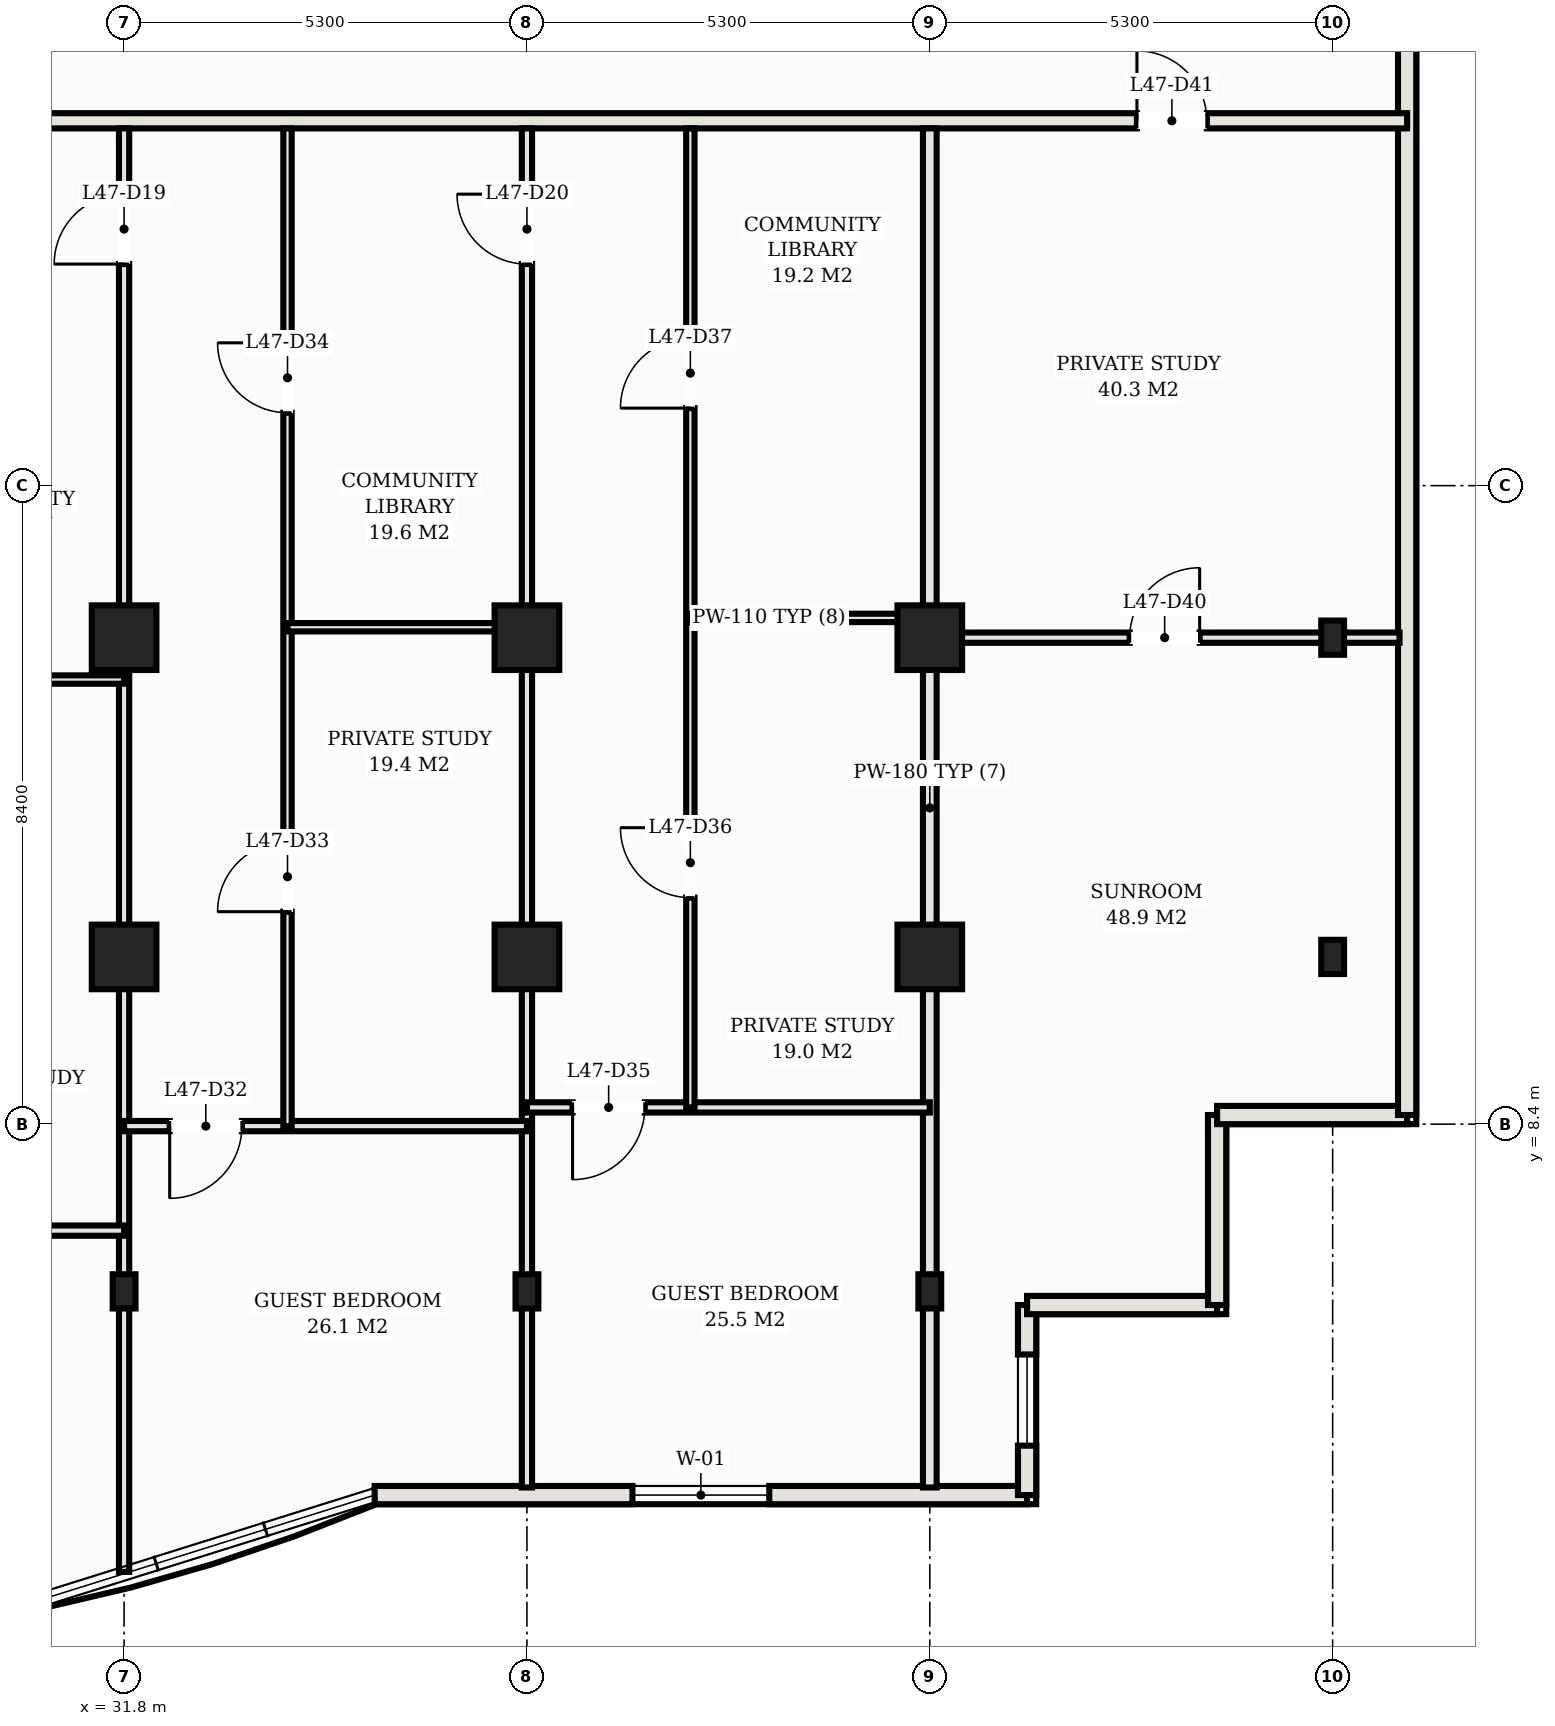
"""IFC4 building model, lengths in metres.
Left out: names, types, materials, properties, quantities, classifications, styles, units other than length and angle.
Written with IfcOpenShell. Run it as: python <this file> out.ifc"""

import sys

from ifc_helpers import new_model, si_unit, direction, frame, frame_2d, origin, origin_2d, place, context, subcontext, project, spatial, rectangle, hollow_rectangle, extrude, element, fill, save


model = new_model("IFC4")
c1 = context("Model", 3, precision=1e-05, world=origin(), true_north=direction((0.0, 1.0)))
c2 = subcontext(c1, "Body", "Model", "MODEL_VIEW")
j1 = project(units=[si_unit("LENGTHUNIT", "METRE"), si_unit("PLANEANGLEUNIT", "RADIAN")], contexts=[c1])
p1 = place(None, origin())
s1 = spatial("IfcSite", under=j1, at=p1, CompositionType="ELEMENT")
p2 = place(p1, origin())
s2 = spatial("IfcBuilding", under=s1, at=p2, CompositionType="ELEMENT")
p3 = place(p2, frame((0.0, 0.0, 172.2)))
s3 = spatial("IfcBuildingStorey", under=s2, at=p3, CompositionType="ELEMENT", Elevation=172.2)
for number, where, z_axis, x_axis in (
    (1, (31.8, 14.8, 0.0), (0.0, 0.0, 1.0), (1.0, 0.0, 0.0)),
    (2, (31.8, 10.6, 0.0), (0.0, 0.0, 1.0), (1.0, 0.0, 0.0)),
    (3, (37.1, 14.8, 0.0), (0.0, 0.0, 1.0), (1.0, 0.0, 0.0)),
    (4, (37.1, 10.6, 0.0), (0.0, 0.0, 1.0), (1.0, 0.0, 0.0)),
    (5, (42.4, 14.8, 0.0), (0.0, 0.0, 1.0), (1.0, 0.0, 0.0)),
    (6, (42.4, 10.6, 0.0), (0.0, 0.0, 1.0), (1.0, 0.0, 0.0)),
):
    element("IfcColumn", number, at=place(p3, frame(where, z_axis=z_axis, x_axis=x_axis)), inside=s3, PredefinedType="COLUMN", context=c2, shape_type="SweptSolid", body=[
        extrude(hollow_rectangle(XDim=0.85, YDim=0.85, WallThickness=0.028, at=origin_2d()), origin(), (0.0, 0.0, 1.0), 3.3),
    ])
for number, where, z_axis, x_axis in (
    (7, (31.8, 6.2, 0.0), (0.0, 0.0, 1.0), (1.0, 0.0, 0.0)),
    (8, (37.1, 6.2, 0.0), (0.0, 0.0, 1.0), (1.0, 0.0, 0.0)),
    (9, (42.4, 6.2, 0.0), (0.0, 0.0, 1.0), (1.0, 0.0, 0.0)),
    (10, (47.7, 10.6, 0.0), (0.0, 0.0, 1.0), (1.0, 0.0, 0.0)),
    (11, (47.7, 14.8, 0.0), (0.0, 0.0, 1.0), (1.0, 0.0, 0.0)),
):
    element("IfcColumn", number, at=place(p3, frame(where, z_axis=z_axis, x_axis=x_axis)), inside=s3, PredefinedType="COLUMN", context=c2, shape_type="SweptSolid", body=[
        extrude(hollow_rectangle(XDim=0.3, YDim=0.45, WallThickness=0.016, at=origin_2d()), origin(), (0.0, 0.0, 1.0), 3.3),
    ])
p4 = place(p3, frame((35.097, 3.52, 0.0), z_axis=(0.0, 0.0, 1.0), x_axis=(1.0, 0.0, 0.0)))
e12 = element("IfcWall", 12, at=p4, inside=s3, PredefinedType="SOLIDWALL", context=c2, shape_type="SweptSolid", body=[
    extrude(rectangle(XDim=8.583, YDim=0.24, at=frame_2d((4.292, 0.0))), origin(), (0.0, 0.0, 1.0), 3.1),
])
p5 = place(p4, frame((3.391, 0.0, 0.75)))
e13 = element("IfcOpeningElement", 13, at=p5, cuts=e12, PredefinedType="OPENING", context=c2, shape_type="SweptSolid", body=[
    extrude(rectangle(XDim=1.8, YDim=1.7, at=frame_2d((0.9, 0.85))), frame((0.0, 0.13, 0.0), z_axis=(0.0, -1.0, 0.0), x_axis=(1.0, 0.0, 0.0)), (0.0, 0.0, 1.0), 0.26),
])
p6 = place(p3, frame((43.68, 3.52, 0.0), z_axis=(0.0, 0.0, 1.0), x_axis=(0.0, 1.0, 0.0)))
e14 = element("IfcWall", 14, at=p6, inside=s3, PredefinedType="SOLIDWALL", context=c2, shape_type="SweptSolid", body=[
    extrude(rectangle(XDim=2.5, YDim=0.24, at=frame_2d((1.25, 0.0))), origin(), (0.0, 0.0, 1.0), 3.1),
])
p7 = place(p6, frame((0.65, 0.0, 0.75)))
e15 = element("IfcOpeningElement", 15, at=p7, cuts=e14, PredefinedType="OPENING", context=c2, shape_type="SweptSolid", body=[
    extrude(rectangle(XDim=1.2, YDim=1.5, at=frame_2d((0.6, 0.75))), frame((0.0, 0.13, 0.0), z_axis=(0.0, -1.0, 0.0), x_axis=(1.0, 0.0, 0.0)), (0.0, 0.0, 1.0), 0.26),
])
for number, where, z_axis, x_axis in (
    (16, (43.68, 6.02, 0.0), (0.0, 0.0, 1.0), (1.0, 0.0, 0.0)),
    (17, (46.18, 6.02, 0.0), (0.0, 0.0, 1.0), (0.0, 1.0, 0.0)),
    (18, (46.18, 8.52, 0.0), (0.0, 0.0, 1.0), (1.0, 0.0, 0.0)),
):
    element("IfcWall", number, at=place(p3, frame(where, z_axis=z_axis, x_axis=x_axis)), inside=s3, PredefinedType="SOLIDWALL", context=c2, shape_type="SweptSolid", body=[
        extrude(rectangle(XDim=2.5, YDim=0.24, at=frame_2d((1.25, 0.0))), origin(), (0.0, 0.0, 1.0), 3.1),
    ])
p8 = place(p3, frame((48.68, 8.52, 0.0), z_axis=(0.0, 0.0, 1.0), x_axis=(0.0, 1.0, 0.0)))
e19 = element("IfcWall", 19, at=p8, inside=s3, PredefinedType="SOLIDWALL", context=c2, shape_type="SweptSolid", body=[
    extrude(rectangle(XDim=27.41, YDim=0.24, at=frame_2d((13.705, 0.0))), origin(), (0.0, 0.0, 1.0), 3.1),
])
p9 = place(p8, frame((19.48, 0.0, 0.0)))
e20 = element("IfcOpeningElement", 20, at=p9, cuts=e19, PredefinedType="OPENING", context=c2, shape_type="SweptSolid", body=[
    extrude(rectangle(XDim=1.8, YDim=2.2, at=frame_2d((0.9, 1.1))), frame((0.0, 0.13, 0.0), z_axis=(0.0, -1.0, 0.0), x_axis=(1.0, 0.0, 0.0)), (0.0, 0.0, 1.0), 0.26),
])
p10 = place(p3, frame((4.32, 21.6, 0.0), z_axis=(0.0, 0.0, 1.0), x_axis=(1.0, 0.0, 0.0)))
e21 = element("IfcWall", 21, at=p10, inside=s3, PredefinedType="PARTITIONING", context=c2, shape_type="SweptSolid", body=[
    extrude(rectangle(XDim=44.36, YDim=0.2, at=frame_2d((22.18, 0.0))), origin(), (0.0, 0.0, 1.0), 2.38),
])
p11 = place(p10, frame((7.03, 0.0, 0.0)))
e22 = element("IfcOpeningElement", 22, at=p11, cuts=e21, PredefinedType="OPENING", context=c2, shape_type="SweptSolid", body=[
    extrude(rectangle(XDim=1.1, YDim=2.25, at=frame_2d((0.55, 1.125))), frame((0.0, 0.11, 0.0), z_axis=(0.0, -1.0, 0.0), x_axis=(1.0, 0.0, 0.0)), (0.0, 0.0, 1.0), 0.22),
])
p12 = place(p10, frame((2.635, 0.0, 0.0)))
e23 = element("IfcOpeningElement", 23, at=p12, cuts=e21, PredefinedType="OPENING", context=c2, shape_type="SweptSolid", body=[
    extrude(rectangle(XDim=0.92, YDim=2.15, at=frame_2d((0.46, 1.075))), frame((0.0, 0.11, 0.0), z_axis=(0.0, -1.0, 0.0), x_axis=(1.0, 0.0, 0.0)), (0.0, 0.0, 1.0), 0.22),
])
p13 = place(p10, frame((40.805, 0.0, 0.0)))
e24 = element("IfcOpeningElement", 24, at=p13, cuts=e21, PredefinedType="OPENING", context=c2, shape_type="SweptSolid", body=[
    extrude(rectangle(XDim=0.92, YDim=2.15, at=frame_2d((0.46, 1.075))), frame((0.0, 0.11, 0.0), z_axis=(0.0, -1.0, 0.0), x_axis=(1.0, 0.0, 0.0)), (0.0, 0.0, 1.0), 0.22),
])
p14 = place(p3, frame((42.4, 3.62, 0.0), z_axis=(0.0, 0.0, 1.0), x_axis=(0.0, 1.0, 0.0)))
e25 = element("IfcWall", 25, at=p14, inside=s3, PredefinedType="PARTITIONING", context=c2, shape_type="SweptSolid", body=[
    extrude(rectangle(XDim=17.88, YDim=0.18, at=frame_2d((8.94, 0.0))), origin(), (0.0, 0.0, 1.0), 2.38),
])
p15 = place(p3, frame((31.8, 2.509, 0.0), z_axis=(0.0, 0.0, 1.0), x_axis=(0.0, 1.0, 0.0)))
e26 = element("IfcWall", 26, at=p15, inside=s3, PredefinedType="PARTITIONING", context=c2, shape_type="SweptSolid", body=[
    extrude(rectangle(XDim=18.991, YDim=0.135, at=frame_2d((9.496, 0.0))), origin(), (0.0, 0.0, 1.0), 2.38),
])
p16 = place(p15, frame((17.206, 0.0, 0.0)))
e27 = element("IfcOpeningElement", 27, at=p16, cuts=e26, PredefinedType="OPENING", context=c2, shape_type="SweptSolid", body=[
    extrude(rectangle(XDim=0.92, YDim=2.15, at=frame_2d((0.46, 1.075))), frame((0.0, 0.078, 0.0), z_axis=(0.0, -1.0, 0.0), x_axis=(1.0, 0.0, 0.0)), (0.0, 0.0, 1.0), 0.155),
])
p17 = place(p3, frame((37.1, 3.62, 0.0), z_axis=(0.0, 0.0, 1.0), x_axis=(0.0, 1.0, 0.0)))
e28 = element("IfcWall", 28, at=p17, inside=s3, PredefinedType="PARTITIONING", context=c2, shape_type="SweptSolid", body=[
    extrude(rectangle(XDim=17.88, YDim=0.135, at=frame_2d((8.94, 0.0))), origin(), (0.0, 0.0, 1.0), 2.38),
])
p18 = place(p17, frame((16.095, 0.0, 0.0)))
e29 = element("IfcOpeningElement", 29, at=p18, cuts=e28, PredefinedType="OPENING", context=c2, shape_type="SweptSolid", body=[
    extrude(rectangle(XDim=0.92, YDim=2.15, at=frame_2d((0.46, 1.075))), frame((0.0, 0.078, 0.0), z_axis=(0.0, -1.0, 0.0), x_axis=(1.0, 0.0, 0.0)), (0.0, 0.0, 1.0), 0.155),
])
p19 = place(p3, frame((26.5, 6.999, 0.0), z_axis=(0.0, 0.0, 1.0), x_axis=(1.0, 0.0, 0.0)))
e30 = element("IfcWall", 30, at=p19, inside=s3, PredefinedType="PARTITIONING", context=c2, shape_type="SweptSolid", body=[
    extrude(rectangle(XDim=5.3, YDim=0.135, at=frame_2d((2.65, 0.0))), origin(), (0.0, 0.0, 1.0), 2.38),
])
p20 = place(p19, frame((0.8, 0.0, 0.0)))
e31 = element("IfcOpeningElement", 31, at=p20, cuts=e30, PredefinedType="OPENING", context=c2, shape_type="SweptSolid", body=[
    extrude(rectangle(XDim=0.95, YDim=2.15, at=frame_2d((0.475, 1.075))), frame((0.0, 0.078, 0.0), z_axis=(0.0, -1.0, 0.0), x_axis=(1.0, 0.0, 0.0)), (0.0, 0.0, 1.0), 0.155),
])
p21 = place(p3, frame((28.65, 14.249, 0.0), z_axis=(0.0, 0.0, 1.0), x_axis=(1.0, 0.0, 0.0)))
e32 = element("IfcWall", 32, at=p21, inside=s3, PredefinedType="MOVABLE", context=c2, shape_type="SweptSolid", body=[
    extrude(rectangle(XDim=3.15, YDim=0.11, at=frame_2d((1.575, 0.0))), origin(), (0.0, 0.0, 1.0), 2.38),
])
p22 = place(p3, frame((31.8, 8.374, 0.0), z_axis=(0.0, 0.0, 1.0), x_axis=(1.0, 0.0, 0.0)))
e33 = element("IfcWall", 33, at=p22, inside=s3, PredefinedType="PARTITIONING", context=c2, shape_type="SweptSolid", body=[
    extrude(rectangle(XDim=5.3, YDim=0.135, at=frame_2d((2.65, 0.0))), origin(), (0.0, 0.0, 1.0), 2.38),
])
p23 = place(p22, frame((0.6, 0.0, 0.0)))
e34 = element("IfcOpeningElement", 34, at=p23, cuts=e33, PredefinedType="OPENING", context=c2, shape_type="SweptSolid", body=[
    extrude(rectangle(XDim=0.95, YDim=2.15, at=frame_2d((0.475, 1.075))), frame((0.0, 0.078, 0.0), z_axis=(0.0, -1.0, 0.0), x_axis=(1.0, 0.0, 0.0)), (0.0, 0.0, 1.0), 0.155),
])
p24 = place(p3, frame((33.95, 8.374, 0.0), z_axis=(0.0, 0.0, 1.0), x_axis=(0.0, 1.0, 0.0)))
e35 = element("IfcWall", 35, at=p24, inside=s3, PredefinedType="MOVABLE", context=c2, shape_type="SweptSolid", body=[
    extrude(rectangle(XDim=13.126, YDim=0.11, at=frame_2d((6.563, 0.0))), origin(), (0.0, 0.0, 1.0), 2.38),
])
p25 = place(p24, frame((2.821, 0.0, 0.0)))
e36 = element("IfcOpeningElement", 36, at=p25, cuts=e35, PredefinedType="OPENING", context=c2, shape_type="SweptSolid", body=[
    extrude(rectangle(XDim=0.92, YDim=2.15, at=frame_2d((0.46, 1.075))), frame((0.0, 0.065, 0.0), z_axis=(0.0, -1.0, 0.0), x_axis=(1.0, 0.0, 0.0)), (0.0, 0.0, 1.0), 0.13),
])
p26 = place(p24, frame((9.385, 0.0, 0.0)))
e37 = element("IfcOpeningElement", 37, at=p26, cuts=e35, PredefinedType="OPENING", context=c2, shape_type="SweptSolid", body=[
    extrude(rectangle(XDim=0.92, YDim=2.15, at=frame_2d((0.46, 1.075))), frame((0.0, 0.065, 0.0), z_axis=(0.0, -1.0, 0.0), x_axis=(1.0, 0.0, 0.0)), (0.0, 0.0, 1.0), 0.13),
])
p27 = place(p3, frame((33.95, 14.937, 0.0), z_axis=(0.0, 0.0, 1.0), x_axis=(1.0, 0.0, 0.0)))
e38 = element("IfcWall", 38, at=p27, inside=s3, PredefinedType="MOVABLE", context=c2, shape_type="SweptSolid", body=[
    extrude(rectangle(XDim=3.15, YDim=0.11, at=frame_2d((1.575, 0.0))), origin(), (0.0, 0.0, 1.0), 2.38),
])
p28 = place(p3, frame((37.1, 8.62, 0.0), z_axis=(0.0, 0.0, 1.0), x_axis=(1.0, 0.0, 0.0)))
e39 = element("IfcWall", 39, at=p28, inside=s3, PredefinedType="PARTITIONING", context=c2, shape_type="SweptSolid", body=[
    extrude(rectangle(XDim=5.3, YDim=0.135, at=frame_2d((2.65, 0.0))), origin(), (0.0, 0.0, 1.0), 2.38),
])
p29 = place(p28, frame((0.6, 0.0, 0.0)))
e40 = element("IfcOpeningElement", 40, at=p29, cuts=e39, PredefinedType="OPENING", context=c2, shape_type="SweptSolid", body=[
    extrude(rectangle(XDim=0.95, YDim=2.15, at=frame_2d((0.475, 1.075))), frame((0.0, 0.078, 0.0), z_axis=(0.0, -1.0, 0.0), x_axis=(1.0, 0.0, 0.0)), (0.0, 0.0, 1.0), 0.155),
])
p30 = place(p3, frame((39.25, 8.62, 0.0), z_axis=(0.0, 0.0, 1.0), x_axis=(0.0, 1.0, 0.0)))
e41 = element("IfcWall", 41, at=p30, inside=s3, PredefinedType="MOVABLE", context=c2, shape_type="SweptSolid", body=[
    extrude(rectangle(XDim=12.88, YDim=0.11, at=frame_2d((6.44, 0.0))), origin(), (0.0, 0.0, 1.0), 2.38),
])
p31 = place(p30, frame((2.76, 0.0, 0.0)))
e42 = element("IfcOpeningElement", 42, at=p31, cuts=e41, PredefinedType="OPENING", context=c2, shape_type="SweptSolid", body=[
    extrude(rectangle(XDim=0.92, YDim=2.15, at=frame_2d((0.46, 1.075))), frame((0.0, 0.065, 0.0), z_axis=(0.0, -1.0, 0.0), x_axis=(1.0, 0.0, 0.0)), (0.0, 0.0, 1.0), 0.13),
])
p32 = place(p30, frame((9.2, 0.0, 0.0)))
e43 = element("IfcOpeningElement", 43, at=p32, cuts=e41, PredefinedType="OPENING", context=c2, shape_type="SweptSolid", body=[
    extrude(rectangle(XDim=0.92, YDim=2.15, at=frame_2d((0.46, 1.075))), frame((0.0, 0.065, 0.0), z_axis=(0.0, -1.0, 0.0), x_axis=(1.0, 0.0, 0.0)), (0.0, 0.0, 1.0), 0.13),
])
p33 = place(p3, frame((39.25, 15.06, 0.0), z_axis=(0.0, 0.0, 1.0), x_axis=(1.0, 0.0, 0.0)))
e44 = element("IfcWall", 44, at=p33, inside=s3, PredefinedType="MOVABLE", context=c2, shape_type="SweptSolid", body=[
    extrude(rectangle(XDim=3.15, YDim=0.11, at=frame_2d((1.575, 0.0))), origin(), (0.0, 0.0, 1.0), 2.38),
])
p34 = place(p3, frame((42.4, 14.8, 0.0), z_axis=(0.0, 0.0, 1.0), x_axis=(1.0, 0.0, 0.0)))
e45 = element("IfcWall", 45, at=p34, inside=s3, PredefinedType="PARTITIONING", context=c2, shape_type="SweptSolid", body=[
    extrude(rectangle(XDim=6.18, YDim=0.135, at=frame_2d((3.09, 0.0))), origin(), (0.0, 0.0, 1.0), 2.38),
])
p35 = place(p34, frame((2.63, 0.0, 0.0)))
e46 = element("IfcOpeningElement", 46, at=p35, cuts=e45, PredefinedType="OPENING", context=c2, shape_type="SweptSolid", body=[
    extrude(rectangle(XDim=0.92, YDim=2.15, at=frame_2d((0.46, 1.075))), frame((0.0, 0.078, 0.0), z_axis=(0.0, -1.0, 0.0), x_axis=(1.0, 0.0, 0.0)), (0.0, 0.0, 1.0), 0.155),
])
p36 = place(p5, origin())
e47 = element("IfcWindow", 47, at=p36, inside=s3, PartitioningType="SINGLE_PANEL", PredefinedType="WINDOW", context=c2, shape_type="SweptSolid", body=[
    extrude(rectangle(XDim=1.8, YDim=1.7, at=frame_2d((0.9, 0.85))), frame((0.0, 0.03, 0.0), z_axis=(0.0, -1.0, 0.0), x_axis=(1.0, 0.0, 0.0)), (0.0, 0.0, 1.0), 0.06),
])
fill(e13, e47)
p37 = place(p7, origin())
e48 = element("IfcWindow", 48, at=p37, inside=s3, PartitioningType="SINGLE_PANEL", PredefinedType="WINDOW", context=c2, shape_type="SweptSolid", body=[
    extrude(rectangle(XDim=1.2, YDim=1.5, at=frame_2d((0.6, 0.75))), frame((0.0, 0.03, 0.0), z_axis=(0.0, -1.0, 0.0), x_axis=(1.0, 0.0, 0.0)), (0.0, 0.0, 1.0), 0.06),
])
fill(e15, e48)
p38 = place(p16, origin())
e49 = element("IfcDoor", 49, at=p38, inside=s3, OperationType="SINGLE_SWING_LEFT", PredefinedType="DOOR", context=c2, shape_type="SweptSolid", body=[
    extrude(rectangle(XDim=0.92, YDim=2.15, at=frame_2d((0.46, 1.075))), frame((0.0, 0.025, 0.0), z_axis=(0.0, -1.0, 0.0), x_axis=(1.0, 0.0, 0.0)), (0.0, 0.0, 1.0), 0.05),
])
fill(e27, e49)
p39 = place(p18, origin())
e50 = element("IfcDoor", 50, at=p39, inside=s3, OperationType="SINGLE_SWING_RIGHT", PredefinedType="DOOR", context=c2, shape_type="SweptSolid", body=[
    extrude(rectangle(XDim=0.92, YDim=2.15, at=frame_2d((0.46, 1.075))), frame((0.0, 0.025, 0.0), z_axis=(0.0, -1.0, 0.0), x_axis=(1.0, 0.0, 0.0)), (0.0, 0.0, 1.0), 0.05),
])
fill(e29, e50)
p40 = place(p23, frame((0.95, 0.0, 0.0), z_axis=(0.0, 0.0, 1.0), x_axis=(-1.0, 0.0, 0.0)))
e51 = element("IfcDoor", 51, at=p40, inside=s3, OperationType="SINGLE_SWING_RIGHT", PredefinedType="DOOR", context=c2, shape_type="SweptSolid", body=[
    extrude(rectangle(XDim=0.95, YDim=2.15, at=frame_2d((0.475, 1.075))), frame((0.0, 0.025, 0.0), z_axis=(0.0, -1.0, 0.0), x_axis=(1.0, 0.0, 0.0)), (0.0, 0.0, 1.0), 0.05),
])
fill(e34, e51)
p41 = place(p25, origin())
e52 = element("IfcDoor", 52, at=p41, inside=s3, OperationType="SINGLE_SWING_LEFT", PredefinedType="DOOR", context=c2, shape_type="SweptSolid", body=[
    extrude(rectangle(XDim=0.92, YDim=2.15, at=frame_2d((0.46, 1.075))), frame((0.0, 0.025, 0.0), z_axis=(0.0, -1.0, 0.0), x_axis=(1.0, 0.0, 0.0)), (0.0, 0.0, 1.0), 0.05),
])
fill(e36, e52)
p42 = place(p26, origin())
e53 = element("IfcDoor", 53, at=p42, inside=s3, OperationType="SINGLE_SWING_RIGHT", PredefinedType="DOOR", context=c2, shape_type="SweptSolid", body=[
    extrude(rectangle(XDim=0.92, YDim=2.15, at=frame_2d((0.46, 1.075))), frame((0.0, 0.025, 0.0), z_axis=(0.0, -1.0, 0.0), x_axis=(1.0, 0.0, 0.0)), (0.0, 0.0, 1.0), 0.05),
])
fill(e37, e53)
p43 = place(p29, frame((0.95, 0.0, 0.0), z_axis=(0.0, 0.0, 1.0), x_axis=(-1.0, 0.0, 0.0)))
e54 = element("IfcDoor", 54, at=p43, inside=s3, OperationType="SINGLE_SWING_RIGHT", PredefinedType="DOOR", context=c2, shape_type="SweptSolid", body=[
    extrude(rectangle(XDim=0.95, YDim=2.15, at=frame_2d((0.475, 1.075))), frame((0.0, 0.025, 0.0), z_axis=(0.0, -1.0, 0.0), x_axis=(1.0, 0.0, 0.0)), (0.0, 0.0, 1.0), 0.05),
])
fill(e40, e54)
p44 = place(p31, origin())
e55 = element("IfcDoor", 55, at=p44, inside=s3, OperationType="SINGLE_SWING_RIGHT", PredefinedType="DOOR", context=c2, shape_type="SweptSolid", body=[
    extrude(rectangle(XDim=0.92, YDim=2.15, at=frame_2d((0.46, 1.075))), frame((0.0, 0.025, 0.0), z_axis=(0.0, -1.0, 0.0), x_axis=(1.0, 0.0, 0.0)), (0.0, 0.0, 1.0), 0.05),
])
fill(e42, e55)
p45 = place(p32, origin())
e56 = element("IfcDoor", 56, at=p45, inside=s3, OperationType="SINGLE_SWING_LEFT", PredefinedType="DOOR", context=c2, shape_type="SweptSolid", body=[
    extrude(rectangle(XDim=0.92, YDim=2.15, at=frame_2d((0.46, 1.075))), frame((0.0, 0.025, 0.0), z_axis=(0.0, -1.0, 0.0), x_axis=(1.0, 0.0, 0.0)), (0.0, 0.0, 1.0), 0.05),
])
fill(e43, e56)
p46 = place(p35, origin())
e57 = element("IfcDoor", 57, at=p46, inside=s3, OperationType="SINGLE_SWING_RIGHT", PredefinedType="DOOR", context=c2, shape_type="SweptSolid", body=[
    extrude(rectangle(XDim=0.92, YDim=2.15, at=frame_2d((0.46, 1.075))), frame((0.0, 0.025, 0.0), z_axis=(0.0, -1.0, 0.0), x_axis=(1.0, 0.0, 0.0)), (0.0, 0.0, 1.0), 0.05),
])
fill(e46, e57)
p47 = place(p13, origin())
e58 = element("IfcDoor", 58, at=p47, inside=s3, OperationType="SINGLE_SWING_LEFT", PredefinedType="DOOR", context=c2, shape_type="SweptSolid", body=[
    extrude(rectangle(XDim=0.92, YDim=2.15, at=frame_2d((0.46, 1.075))), frame((0.0, 0.025, 0.0), z_axis=(0.0, -1.0, 0.0), x_axis=(1.0, 0.0, 0.0)), (0.0, 0.0, 1.0), 0.05),
])
fill(e24, e58)
save(model, sys.argv[1])
